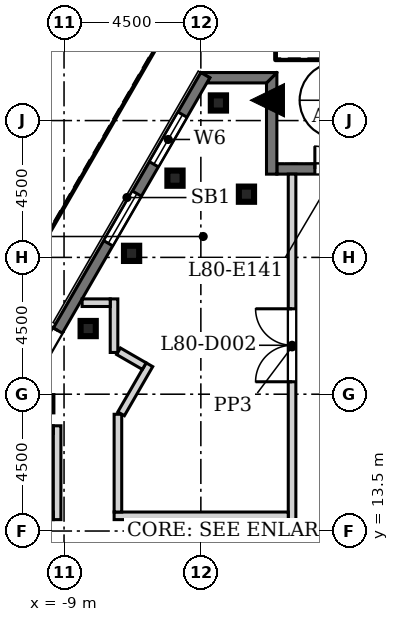
"""IFC4 building model, lengths in metres.
Left out: names, types, materials, properties, quantities, classifications, styles, units other than length and angle.
Written with IfcOpenShell. Run it as: python <this file> out.ifc"""

import sys

from ifc_helpers import new_model, si_unit, direction, frame, frame_2d, origin, origin_2d, place, context, subcontext, project, spatial, polyline, rectangle, hollow_rectangle, outline, extrude, element, fill, save


model = new_model("IFC4")
c1 = context("Model", 3, precision=1e-05, world=origin(), true_north=direction((0.0, 1.0)))
c2 = subcontext(c1, "Body", "Model", "MODEL_VIEW")
j1 = project(units=[si_unit("LENGTHUNIT", "METRE"), si_unit("PLANEANGLEUNIT", "RADIAN")], contexts=[c1])
p1 = place(None, origin())
s1 = spatial("IfcSite", under=j1, at=p1, CompositionType="ELEMENT")
p2 = place(p1, origin())
s2 = spatial("IfcBuilding", under=s1, at=p2, CompositionType="ELEMENT")
p3 = place(p2, frame((0.0, 0.0, 355.1)))
s3 = spatial("IfcBuildingStorey", under=s2, at=p3, CompositionType="ELEMENT", Elevation=355.1)
for number, where, z_axis, x_axis in (
    (1, (-3.0, 24.579, 0.0), (0.0, 0.0, 1.0), (1.0, 0.0, 0.0)),
    (2, (-3.923, 27.579, 0.0), (0.0, 0.0, 1.0), (1.0, 0.0, 0.0)),
    (3, (-5.351, 25.106, 0.0), (0.0, 0.0, 1.0), (1.0, 0.0, 0.0)),
    (4, (-6.778, 22.633, 0.0), (0.0, 0.0, 1.0), (1.0, 0.0, 0.0)),
    (5, (-8.206, 20.16, 0.0), (0.0, 0.0, 1.0), (1.0, 0.0, 0.0)),
    (6, (-9.634, 17.687, 0.0), (0.0, 0.0, 1.0), (1.0, 0.0, 0.0)),
):
    element("IfcColumn", number, at=place(p3, frame(where, z_axis=z_axis, x_axis=x_axis)), inside=s3, PredefinedType="COLUMN", context=c2, shape_type="SweptSolid", body=[
        extrude(hollow_rectangle(XDim=0.5, YDim=0.5, WallThickness=0.025, at=origin_2d()), origin(), (0.0, 0.0, 1.0), 3.9),
    ])
p4 = place(p3, frame((2.0, 25.409, 0.0), z_axis=(0.0, 0.0, 1.0), x_axis=(-1.0, 0.0, 0.0)))
e7 = element("IfcWall", 7, at=p4, inside=s3, PredefinedType="SOLIDWALL", context=c2, shape_type="SweptSolid", body=[
    extrude(rectangle(XDim=4.0, YDim=0.34, at=frame_2d((2.0, 0.0))), origin(), (0.0, 0.0, 1.0), 3.9),
])
p5 = place(p4, frame((1.25, 0.0, 0.0)))
e8 = element("IfcOpeningElement", 8, at=p5, cuts=e7, PredefinedType="OPENING", context=c2, shape_type="SweptSolid", body=[
    extrude(rectangle(XDim=1.5, YDim=2.4, at=frame_2d((0.75, 1.2))), frame((0.0, 0.18, 0.0), z_axis=(0.0, -1.0, 0.0), x_axis=(1.0, 0.0, 0.0)), (0.0, 0.0, 1.0), 0.36),
])
p6 = place(p3, origin())
e9 = element("IfcWall", 9, at=p6, inside=s3, PredefinedType="SOLIDWALL", context=c2, shape_type="SweptSolid", body=[
    extrude(outline(polyline([(-2.0, 28.58), (-2.0, 25.238), (-2.341, 25.238), (-2.341, 28.239), (-2.0, 28.58), (-2.0, 28.58)])), origin(), (0.0, 0.0, 1.0), 3.9),
])
p7 = place(p3, origin())
e10 = element("IfcWall", 10, at=p7, inside=s3, PredefinedType="SOLIDWALL", context=c2, shape_type="SweptSolid", body=[
    extrude(outline(polyline([(-4.305, 28.238), (-4.206, 28.409), (-4.501, 28.579), (-4.501, 28.579), (-1.999, 28.579), (-1.999, 28.579), (-2.34, 28.238), (-4.305, 28.238)])), origin(), (0.0, 0.0, 1.0), 3.9),
])
p8 = place(p3, frame((-4.353, 28.494, 0.0), z_axis=(0.0, 0.0, 1.0), x_axis=(-0.49999894854, -0.866026010844, 0.0)))
e11 = element("IfcWall", 11, at=p8, inside=s3, PredefinedType="SOLIDWALL", context=c2, shape_type="SweptSolid", body=[
    extrude(rectangle(XDim=24.0, YDim=0.34, at=frame_2d((12.0, 0.0))), origin(), (0.0, 0.0, 1.0), 3.9),
])
p9 = place(p8, frame((1.5, 0.0, 0.9)))
e12 = element("IfcOpeningElement", 12, at=p9, cuts=e11, PredefinedType="OPENING", context=c2, shape_type="SweptSolid", body=[
    extrude(rectangle(XDim=1.885, YDim=3.0, at=frame_2d((0.942, 1.5))), frame((0.0, 0.18, 0.0), z_axis=(0.0, -1.0, 0.0), x_axis=(1.0, 0.0, 0.0)), (0.0, 0.0, 1.0), 0.36),
])
p10 = place(p8, frame((4.5, 0.0, 0.9)))
e13 = element("IfcOpeningElement", 13, at=p10, cuts=e11, PredefinedType="OPENING", context=c2, shape_type="SweptSolid", body=[
    extrude(rectangle(XDim=1.885, YDim=3.0, at=frame_2d((0.942, 1.5))), frame((0.0, 0.18, 0.0), z_axis=(0.0, -1.0, 0.0), x_axis=(1.0, 0.0, 0.0)), (0.0, 0.0, 1.0), 0.36),
])
p11 = place(p8, frame((13.5, 0.0, 0.9)))
e14 = element("IfcOpeningElement", 14, at=p11, cuts=e11, PredefinedType="OPENING", context=c2, shape_type="SweptSolid", body=[
    extrude(rectangle(XDim=1.885, YDim=3.0, at=frame_2d((0.942, 1.5))), frame((0.0, 0.18, 0.0), z_axis=(0.0, -1.0, 0.0), x_axis=(1.0, 0.0, 0.0)), (0.0, 0.0, 1.0), 0.36),
])
p12 = place(p8, frame((16.5, 0.0, 0.9)))
e15 = element("IfcOpeningElement", 15, at=p12, cuts=e11, PredefinedType="OPENING", context=c2, shape_type="SweptSolid", body=[
    extrude(rectangle(XDim=1.885, YDim=3.0, at=frame_2d((0.942, 1.5))), frame((0.0, 0.18, 0.0), z_axis=(0.0, -1.0, 0.0), x_axis=(1.0, 0.0, 0.0)), (0.0, 0.0, 1.0), 0.36),
])
p13 = place(p8, frame((19.5, 0.0, 0.9)))
e16 = element("IfcOpeningElement", 16, at=p13, cuts=e11, PredefinedType="OPENING", context=c2, shape_type="SweptSolid", body=[
    extrude(rectangle(XDim=1.885, YDim=3.0, at=frame_2d((0.942, 1.5))), frame((0.0, 0.18, 0.0), z_axis=(0.0, -1.0, 0.0), x_axis=(1.0, 0.0, 0.0)), (0.0, 0.0, 1.0), 0.36),
])
p14 = place(p8, frame((9.7, 0.0, 0.0)))
e17 = element("IfcOpeningElement", 17, at=p14, cuts=e11, PredefinedType="OPENING", context=c2, shape_type="SweptSolid", body=[
    extrude(rectangle(XDim=1.885, YDim=2.6, at=frame_2d((0.942, 1.3))), frame((0.0, 0.18, 0.0), z_axis=(0.0, -1.0, 0.0), x_axis=(1.0, 0.0, 0.0)), (0.0, 0.0, 1.0), 0.36),
])
p15 = place(p3, frame((-1.5, 13.875, 0.0), z_axis=(0.0, 0.0, 1.0), x_axis=(0.0, 1.0, 0.0)))
e18 = element("IfcWall", 18, at=p15, inside=s3, PredefinedType="SOLIDWALL", context=c2, shape_type="SweptSolid", body=[
    extrude(rectangle(XDim=11.364, YDim=0.25, at=frame_2d((5.682, 0.0))), origin(), (0.0, 0.0, 1.0), 3.9),
])
p16 = place(p15, frame((4.534, 0.0, 0.0)))
e19 = element("IfcOpeningElement", 19, at=p16, cuts=e18, PredefinedType="OPENING", context=c2, shape_type="SweptSolid", body=[
    extrude(rectangle(XDim=2.4, YDim=2.4, at=frame_2d((1.2, 1.2))), frame((0.0, 0.135, 0.0), z_axis=(0.0, -1.0, 0.0), x_axis=(1.0, 0.0, 0.0)), (0.0, 0.0, 1.0), 0.27),
])
p17 = place(p3, frame((-7.353, 14.0, 0.0), z_axis=(0.0, 0.0, 1.0), x_axis=(1.0, 0.0, 0.0)))
e20 = element("IfcWall", 20, at=p17, inside=s3, PredefinedType="SOLIDWALL", context=c2, shape_type="SweptSolid", body=[
    extrude(rectangle(XDim=5.728, YDim=0.25, at=frame_2d((2.864, 0.0))), origin(), (0.0, 0.0, 1.0), 3.9),
])
p18 = place(p3, frame((-7.228, 17.34, 0.0), z_axis=(0.0, 0.0, 1.0), x_axis=(0.0, -1.0, 0.0)))
e21 = element("IfcWall", 21, at=p18, inside=s3, PredefinedType="SOLIDWALL", context=c2, shape_type="SweptSolid", body=[
    extrude(rectangle(XDim=3.215, YDim=0.25, at=frame_2d((1.607, 0.0))), origin(), (0.0, 0.0, 1.0), 3.9),
])
p19 = place(p3, frame((-9.228, 13.875, 0.0), z_axis=(0.0, 0.0, 1.0), x_axis=(0.0, 1.0, 0.0)))
e22 = element("IfcWall", 22, at=p19, inside=s3, PredefinedType="SOLIDWALL", context=c2, shape_type="SweptSolid", body=[
    extrude(rectangle(XDim=3.086, YDim=0.25, at=frame_2d((1.543, 0.0))), origin(), (0.0, 0.0, 1.0), 3.9),
])
p20 = place(p3, frame((-6.191, 18.969, 0.0), z_axis=(0.0, 0.0, 1.0), x_axis=(-0.500055009638, -0.865993641626, 0.0)))
e23 = element("IfcWall", 23, at=p20, inside=s3, PredefinedType="SOLIDWALL", context=c2, shape_type="SweptSolid", body=[
    extrude(rectangle(XDim=1.864, YDim=0.25, at=frame_2d((0.932, 0.0))), origin(), (0.0, 0.0, 1.0), 3.9),
])
p21 = place(p3, frame((-7.356, 21.135, 0.0), z_axis=(0.0, 0.0, 1.0), x_axis=(0.0, -1.0, 0.0)))
e24 = element("IfcWall", 24, at=p21, inside=s3, PredefinedType="SOLIDWALL", context=c2, shape_type="SweptSolid", body=[
    extrude(rectangle(XDim=1.762, YDim=0.25, at=frame_2d((0.881, 0.0))), origin(), (0.0, 0.0, 1.0), 3.9),
])
p22 = place(p3, frame((-10.875, 14.0, 0.0), z_axis=(0.0, 0.0, 1.0), x_axis=(1.0, 0.0, 0.0)))
e25 = element("IfcWall", 25, at=p22, inside=s3, PredefinedType="SOLIDWALL", context=c2, shape_type="SweptSolid", body=[
    extrude(rectangle(XDim=1.522, YDim=0.25, at=frame_2d((0.761, 0.0))), origin(), (0.0, 0.0, 1.0), 3.9),
])
p23 = place(p3, frame((-9.353, 16.836, 0.0), z_axis=(0.0, 0.0, 1.0), x_axis=(-1.0, 0.0, 0.0)))
e26 = element("IfcWall", 26, at=p23, inside=s3, PredefinedType="SOLIDWALL", context=c2, shape_type="SweptSolid", body=[
    extrude(rectangle(XDim=1.256, YDim=0.25, at=frame_2d((0.628, 0.0))), origin(), (0.0, 0.0, 1.0), 3.9),
])
p24 = place(p3, frame((-7.208, 19.412, 0.0), z_axis=(0.0, 0.0, 1.0), x_axis=(0.866052515552, -0.499953038101, 0.0)))
e27 = element("IfcWall", 27, at=p24, inside=s3, PredefinedType="SOLIDWALL", context=c2, shape_type="SweptSolid", body=[
    extrude(rectangle(XDim=0.978, YDim=0.25, at=frame_2d((0.489, 0.0))), origin(), (0.0, 0.0, 1.0), 3.9),
])
p25 = place(p3, frame((-8.405, 21.01, 0.0), z_axis=(0.0, 0.0, 1.0), x_axis=(1.0, 0.0, 0.0)))
e28 = element("IfcWall", 28, at=p25, inside=s3, PredefinedType="SOLIDWALL", context=c2, shape_type="SweptSolid", body=[
    extrude(rectangle(XDim=0.924, YDim=0.25, at=frame_2d((0.462, 0.0))), origin(), (0.0, 0.0, 1.0), 3.9),
])
p26 = place(p5, frame((1.5, 0.0, 0.0), z_axis=(0.0, 0.0, 1.0), x_axis=(-1.0, 0.0, 0.0)))
e29 = element("IfcDoor", 29, at=p26, inside=s3, OperationType="DOUBLE_DOOR_SINGLE_SWING", PredefinedType="DOOR", context=c2, shape_type="SweptSolid", body=[
    extrude(rectangle(XDim=1.5, YDim=2.4, at=frame_2d((0.75, 1.2))), frame((0.0, 0.025, 0.0), z_axis=(0.0, -1.0, 0.0), x_axis=(1.0, 0.0, 0.0)), (0.0, 0.0, 1.0), 0.05),
])
fill(e8, e29)
p27 = place(p9, origin())
e30 = element("IfcWindow", 30, at=p27, inside=s3, PartitioningType="SINGLE_PANEL", PredefinedType="WINDOW", context=c2, shape_type="SweptSolid", body=[
    extrude(rectangle(XDim=1.885, YDim=3.0, at=frame_2d((0.942, 1.5))), frame((0.0, 0.11, 0.0), z_axis=(0.0, -1.0, 0.0), x_axis=(1.0, 0.0, 0.0)), (0.0, 0.0, 1.0), 0.06),
])
fill(e12, e30)
p28 = place(p10, origin())
e31 = element("IfcWindow", 31, at=p28, inside=s3, PartitioningType="SINGLE_PANEL", PredefinedType="WINDOW", context=c2, shape_type="SweptSolid", body=[
    extrude(rectangle(XDim=1.885, YDim=3.0, at=frame_2d((0.942, 1.5))), frame((0.0, 0.11, 0.0), z_axis=(0.0, -1.0, 0.0), x_axis=(1.0, 0.0, 0.0)), (0.0, 0.0, 1.0), 0.06),
])
fill(e13, e31)
p29 = place(p14, frame((1.885, 0.0, 0.0), z_axis=(0.0, 0.0, 1.0), x_axis=(-1.0, 0.0, 0.0)))
e32 = element("IfcDoor", 32, at=p29, inside=s3, OperationType="DOUBLE_DOOR_SINGLE_SWING", PredefinedType="DOOR", context=c2, shape_type="SweptSolid", body=[
    extrude(rectangle(XDim=1.885, YDim=2.6, at=frame_2d((0.942, 1.3))), frame((0.0, 0.025, 0.0), z_axis=(0.0, -1.0, 0.0), x_axis=(1.0, 0.0, 0.0)), (0.0, 0.0, 1.0), 0.05),
])
fill(e17, e32)
p30 = place(p16, origin())
e33 = element("IfcDoor", 33, at=p30, inside=s3, OperationType="DOUBLE_DOOR_SINGLE_SWING", PredefinedType="DOOR", context=c2, shape_type="SweptSolid", body=[
    extrude(rectangle(XDim=2.4, YDim=2.4, at=frame_2d((1.2, 1.2))), frame((0.0, 0.025, 0.0), z_axis=(0.0, -1.0, 0.0), x_axis=(1.0, 0.0, 0.0)), (0.0, 0.0, 1.0), 0.05),
])
fill(e19, e33)
save(model, sys.argv[1])
